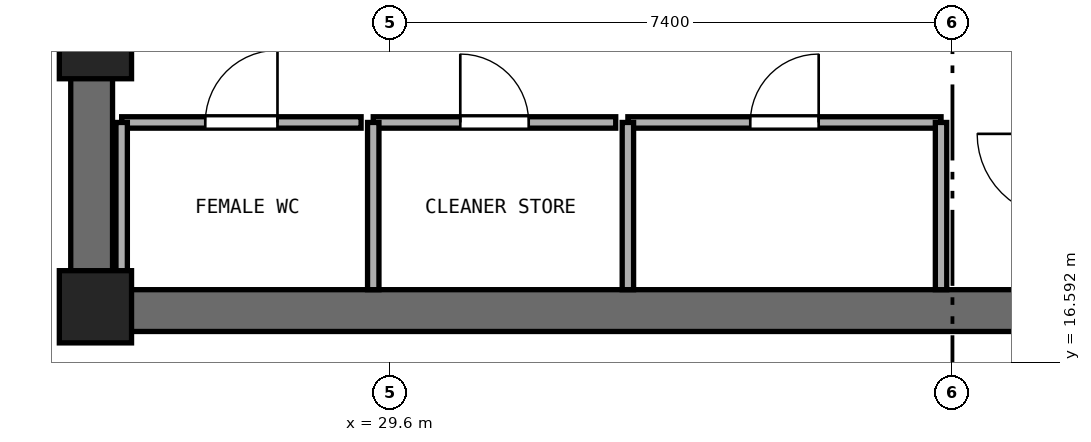
"""IFC4 building model, lengths in metres.
Left out: names, types, materials, properties, quantities, classifications, styles, units other than length and angle.
Written with IfcOpenShell. Run it as: python <this file> out.ifc"""

import sys

from ifc_helpers import new_model, si_unit, direction, frame, frame_2d, origin, origin_2d, place, context, subcontext, project, spatial, rectangle, extrude, element, fill, save


model = new_model("IFC4")
c1 = context("Model", 3, precision=1e-05, world=origin(), true_north=direction((0.0, 1.0)))
c2 = subcontext(c1, "Body", "Model", "MODEL_VIEW")
j1 = project(units=[si_unit("LENGTHUNIT", "METRE"), si_unit("PLANEANGLEUNIT", "RADIAN")], contexts=[c1])
p1 = place(None, origin())
s1 = spatial("IfcSite", under=j1, at=p1, CompositionType="ELEMENT")
p2 = place(p1, origin())
s2 = spatial("IfcBuilding", under=s1, at=p2, CompositionType="ELEMENT")
p3 = place(p2, frame((0.0, 0.0, 166.8)))
s3 = spatial("IfcBuildingStorey", under=s2, at=p3, CompositionType="ELEMENT", Elevation=166.8)
p4 = place(p3, frame((25.4, 17.275, 0.0), z_axis=(0.0, 0.0, 1.0), x_axis=(1.0, 0.0, 0.0)))
e1 = element("IfcWall", 1, at=p4, inside=s3, PredefinedType="SHEAR", context=c2, shape_type="SweptSolid", body=[
    extrude(rectangle(XDim=23.2, YDim=0.55, at=frame_2d((11.6, 0.0))), origin(), (0.0, 0.0, 1.0), 3.54),
])
p5 = place(p3, frame((25.675, 17.55, 0.0), z_axis=(0.0, 0.0, 1.0), x_axis=(0.0, 1.0, 0.0)))
e2 = element("IfcWall", 2, at=p5, inside=s3, PredefinedType="SHEAR", context=c2, shape_type="SweptSolid", body=[
    extrude(rectangle(XDim=15.3, YDim=0.55, at=frame_2d((7.65, 0.0))), origin(), (0.0, 0.0, 1.0), 3.54),
])
p6 = place(p5, frame((6.9, 0.0, 0.0)))
e3 = element("IfcOpeningElement", 3, at=p6, cuts=e2, PredefinedType="OPENING", context=c2, shape_type="SweptSolid", body=[
    extrude(rectangle(XDim=1.5, YDim=2.15, at=frame_2d((0.75, 1.075))), frame((0.0, 0.285, 0.0), z_axis=(0.0, -1.0, 0.0), x_axis=(1.0, 0.0, 0.0)), (0.0, 0.0, 1.0), 0.57),
])
for number, where, z_axis, x_axis in (
    (4, (25.725, 17.325, 0.0), (0.0, 0.0, 1.0), (1.0, 0.0, 0.0)),
    (5, (25.725, 20.8, 0.0), (0.0, 0.0, 1.0), (1.0, 0.0, 0.0)),
):
    element("IfcColumn", number, at=place(p3, frame(where, z_axis=z_axis, x_axis=x_axis)), inside=s3, PredefinedType="PILASTER", context=c2, shape_type="SweptSolid", body=[
        extrude(rectangle(XDim=0.95, YDim=0.95, at=origin_2d()), origin(), (0.0, 0.0, 1.0), 3.8),
    ])
p7 = place(p3, frame((26.07, 19.75, 0.0), z_axis=(0.0, 0.0, 1.0), x_axis=(1.0, 0.0, 0.0)))
e6 = element("IfcWall", 6, at=p7, inside=s3, PredefinedType="PARTITIONING", context=c2, shape_type="SweptSolid", body=[
    extrude(rectangle(XDim=3.15, YDim=0.15, at=frame_2d((1.575, 0.0))), origin(), (0.0, 0.0, 1.0), 3.54),
])
p8 = place(p7, frame((1.1, 0.0, 0.0)))
e7 = element("IfcOpeningElement", 7, at=p8, cuts=e6, PredefinedType="OPENING", context=c2, shape_type="SweptSolid", body=[
    extrude(rectangle(XDim=0.95, YDim=2.1, at=frame_2d((0.475, 1.05))), frame((0.0, 0.085, 0.0), z_axis=(0.0, -1.0, 0.0), x_axis=(1.0, 0.0, 0.0)), (0.0, 0.0, 1.0), 0.17),
])
p9 = place(p3, frame((26.07, 17.55, 0.0), z_axis=(0.0, 0.0, 1.0), x_axis=(0.0, 1.0, 0.0)))
e8 = element("IfcWall", 8, at=p9, inside=s3, PredefinedType="PARTITIONING", context=c2, shape_type="SweptSolid", body=[
    extrude(rectangle(XDim=2.2, YDim=0.15, at=frame_2d((1.1, 0.0))), origin(), (0.0, 0.0, 1.0), 2.64),
])
p10 = place(p3, frame((29.38, 19.75, 0.0), z_axis=(0.0, 0.0, 1.0), x_axis=(1.0, 0.0, 0.0)))
e9 = element("IfcWall", 9, at=p10, inside=s3, PredefinedType="PARTITIONING", context=c2, shape_type="SweptSolid", body=[
    extrude(rectangle(XDim=3.19, YDim=0.15, at=frame_2d((1.595, 0.0))), origin(), (0.0, 0.0, 1.0), 3.54),
])
p11 = place(p10, frame((1.145, 0.0, 0.0)))
e10 = element("IfcOpeningElement", 10, at=p11, cuts=e9, PredefinedType="OPENING", context=c2, shape_type="SweptSolid", body=[
    extrude(rectangle(XDim=0.9, YDim=2.1, at=frame_2d((0.45, 1.05))), frame((0.0, 0.085, 0.0), z_axis=(0.0, -1.0, 0.0), x_axis=(1.0, 0.0, 0.0)), (0.0, 0.0, 1.0), 0.17),
])
p12 = place(p3, frame((29.38, 17.55, 0.0), z_axis=(0.0, 0.0, 1.0), x_axis=(0.0, 1.0, 0.0)))
e11 = element("IfcWall", 11, at=p12, inside=s3, PredefinedType="PARTITIONING", context=c2, shape_type="SweptSolid", body=[
    extrude(rectangle(XDim=2.2, YDim=0.15, at=frame_2d((1.1, 0.0))), origin(), (0.0, 0.0, 1.0), 3.54),
])
p13 = place(p3, frame((32.73, 19.75, 0.0), z_axis=(0.0, 0.0, 1.0), x_axis=(1.0, 0.0, 0.0)))
e12 = element("IfcWall", 12, at=p13, inside=s3, PredefinedType="PARTITIONING", context=c2, shape_type="SweptSolid", body=[
    extrude(rectangle(XDim=4.12, YDim=0.15, at=frame_2d((2.06, 0.0))), origin(), (0.0, 0.0, 1.0), 3.54),
])
p14 = place(p13, frame((1.61, 0.0, 0.0)))
e13 = element("IfcOpeningElement", 13, at=p14, cuts=e12, PredefinedType="OPENING", context=c2, shape_type="SweptSolid", body=[
    extrude(rectangle(XDim=0.9, YDim=2.1, at=frame_2d((0.45, 1.05))), frame((0.0, 0.085, 0.0), z_axis=(0.0, -1.0, 0.0), x_axis=(1.0, 0.0, 0.0)), (0.0, 0.0, 1.0), 0.17),
])
for number, where, z_axis, x_axis in (
    (14, (32.73, 17.55, 0.0), (0.0, 0.0, 1.0), (0.0, 1.0, 0.0)),
    (15, (36.85, 17.55, 0.0), (0.0, 0.0, 1.0), (0.0, 1.0, 0.0)),
):
    element("IfcWall", number, at=place(p3, frame(where, z_axis=z_axis, x_axis=x_axis)), inside=s3, PredefinedType="PARTITIONING", context=c2, shape_type="SweptSolid", body=[
        extrude(rectangle(XDim=2.2, YDim=0.15, at=frame_2d((1.1, 0.0))), origin(), (0.0, 0.0, 1.0), 3.54),
    ])
p15 = place(p8, origin())
e16 = element("IfcDoor", 16, at=p15, inside=s3, OperationType="SINGLE_SWING_RIGHT", PredefinedType="DOOR", context=c2, shape_type="SweptSolid", body=[
    extrude(rectangle(XDim=0.95, YDim=2.1, at=frame_2d((0.475, 1.05))), frame((0.0, 0.025, 0.0), z_axis=(0.0, -1.0, 0.0), x_axis=(1.0, 0.0, 0.0)), (0.0, 0.0, 1.0), 0.05),
])
fill(e7, e16)
p16 = place(p11, origin())
e17 = element("IfcDoor", 17, at=p16, inside=s3, OperationType="SINGLE_SWING_LEFT", PredefinedType="DOOR", context=c2, shape_type="SweptSolid", body=[
    extrude(rectangle(XDim=0.9, YDim=2.1, at=frame_2d((0.45, 1.05))), frame((0.0, 0.025, 0.0), z_axis=(0.0, -1.0, 0.0), x_axis=(1.0, 0.0, 0.0)), (0.0, 0.0, 1.0), 0.05),
])
fill(e10, e17)
p17 = place(p14, origin())
e18 = element("IfcDoor", 18, at=p17, inside=s3, OperationType="SINGLE_SWING_RIGHT", PredefinedType="DOOR", context=c2, shape_type="SweptSolid", body=[
    extrude(rectangle(XDim=0.9, YDim=2.1, at=frame_2d((0.45, 1.05))), frame((0.0, 0.025, 0.0), z_axis=(0.0, -1.0, 0.0), x_axis=(1.0, 0.0, 0.0)), (0.0, 0.0, 1.0), 0.05),
])
fill(e13, e18)
save(model, sys.argv[1])
